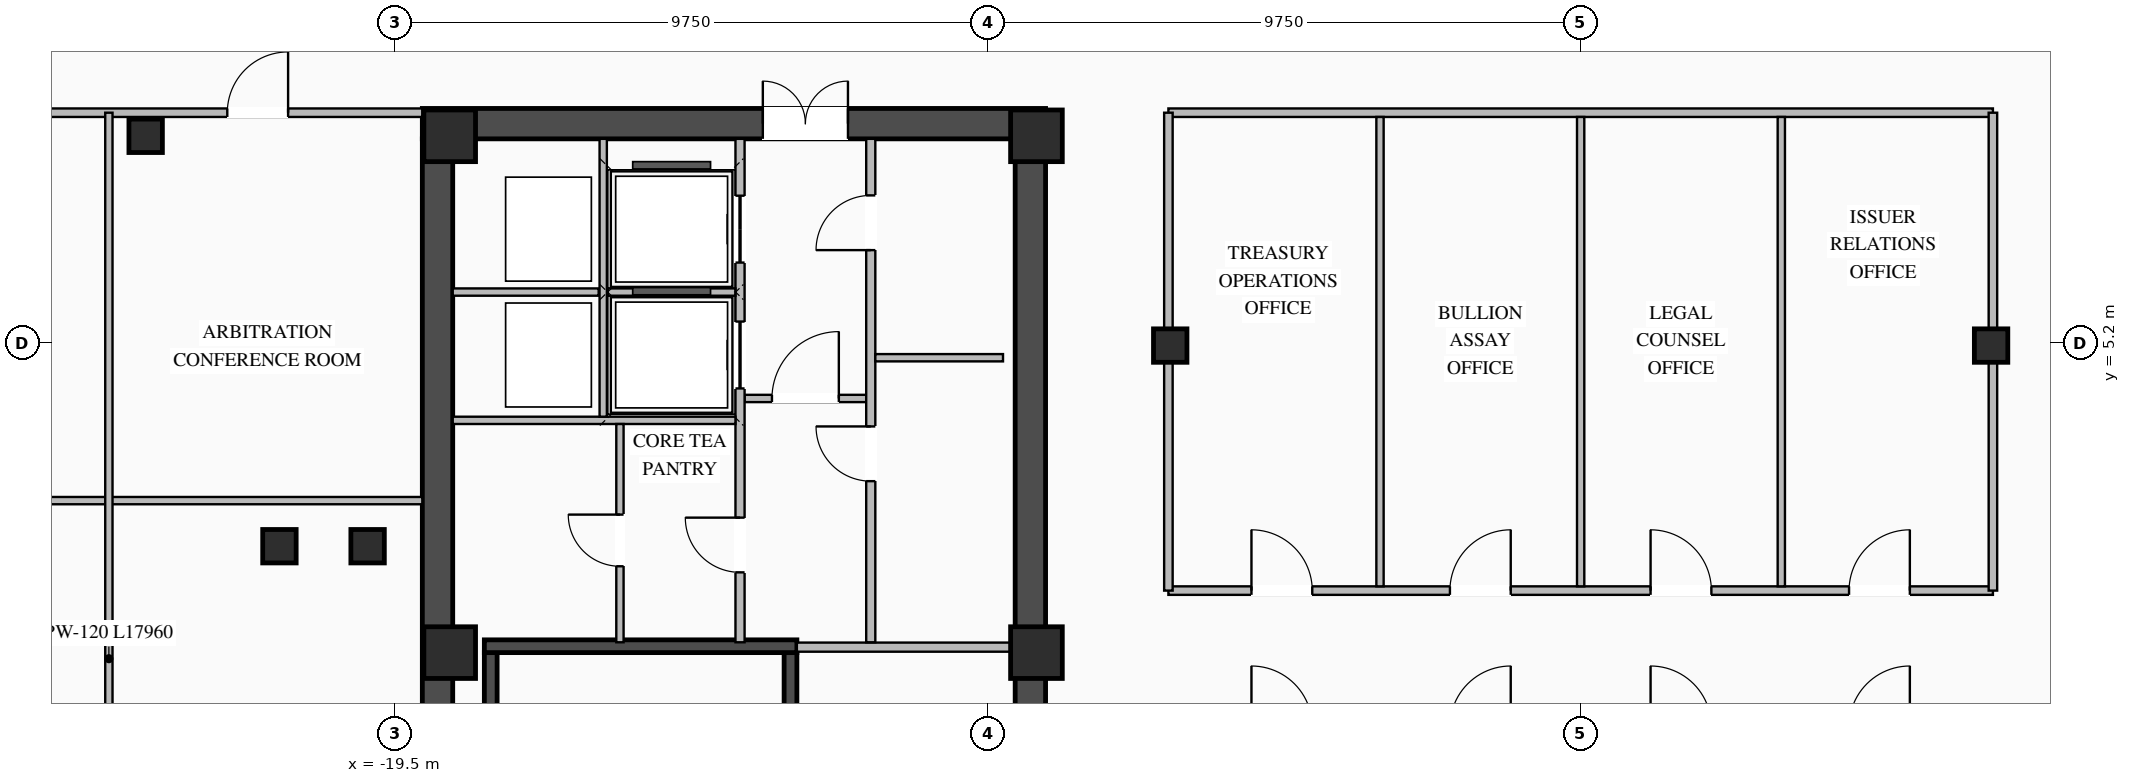
"""IFC4 building model, lengths in metres.
Left out: names, types, materials, properties, quantities, classifications, styles, units other than length and angle.
Written with IfcOpenShell. Run it as: python <this file> out.ifc"""

import sys

from ifc_helpers import new_model, si_unit, direction, frame, frame_2d, origin, origin_2d, place, context, subcontext, project, spatial, rectangle, i_section, extrude, element, fill, save


model = new_model("IFC4")
c1 = context("Model", 3, precision=1e-05, world=origin(), true_north=direction((0.0, 1.0)))
c2 = subcontext(c1, "Body", "Model", "MODEL_VIEW")
j1 = project(units=[si_unit("LENGTHUNIT", "METRE"), si_unit("PLANEANGLEUNIT", "RADIAN")], contexts=[c1])
p1 = place(None, origin())
s1 = spatial("IfcSite", under=j1, at=p1, CompositionType="ELEMENT")
p2 = place(p1, origin())
s2 = spatial("IfcBuilding", under=s1, at=p2, CompositionType="ELEMENT")
p3 = place(p2, frame((0.0, 0.0, 236.1)))
s3 = spatial("IfcBuildingStorey", under=s2, at=p3, CompositionType="ELEMENT", Elevation=236.1)
p4 = place(p3, frame((-19.05, 8.8, 0.0), z_axis=(0.0, 0.0, 1.0), x_axis=(1.0, 0.0, 0.0)))
e1 = element("IfcWall", 1, at=p4, inside=s3, PredefinedType="SHEAR", context=c2, shape_type="SweptSolid", body=[
    extrude(rectangle(XDim=10.25, YDim=0.5, at=frame_2d((5.125, 0.0))), origin(), (0.0, 0.0, 1.0), 3.27),
])
p5 = place(p4, frame((5.6, 0.0, 0.0)))
e2 = element("IfcOpeningElement", 2, at=p5, cuts=e1, PredefinedType="OPENING", context=c2, shape_type="SweptSolid", body=[
    extrude(rectangle(XDim=1.4, YDim=2.05, at=frame_2d((0.7, 1.025))), frame((0.0, 0.26, 0.0), z_axis=(0.0, -1.0, 0.0), x_axis=(1.0, 0.0, 0.0)), (0.0, 0.0, 1.0), 0.52),
])
p6 = place(p3, frame((-18.8, -8.55, 0.0), z_axis=(0.0, 0.0, 1.0), x_axis=(0.0, 1.0, 0.0)))
e3 = element("IfcWall", 3, at=p6, inside=s3, PredefinedType="SHEAR", context=c2, shape_type="SweptSolid", body=[
    extrude(rectangle(XDim=17.1, YDim=0.5, at=frame_2d((8.55, 0.0))), origin(), (0.0, 0.0, 1.0), 3.27),
])
p7 = place(p3, frame((-9.05, -8.55, 0.0), z_axis=(0.0, 0.0, 1.0), x_axis=(0.0, 1.0, 0.0)))
e4 = element("IfcWall", 4, at=p7, inside=s3, PredefinedType="SHEAR", context=c2, shape_type="SweptSolid", body=[
    extrude(rectangle(XDim=17.1, YDim=0.5, at=frame_2d((8.55, 0.0))), origin(), (0.0, 0.0, 1.0), 3.27),
])
p8 = place(p7, frame((5.3, 0.0, 0.0)))
e5 = element("IfcOpeningElement", 5, at=p8, cuts=e4, PredefinedType="OPENING", context=c2, shape_type="SweptSolid", body=[
    extrude(rectangle(XDim=1.1, YDim=2.08, at=frame_2d((0.55, 1.04))), frame((0.0, 0.26, 0.0), z_axis=(0.0, -1.0, 0.0), x_axis=(1.0, 0.0, 0.0)), (0.0, 0.0, 1.0), 0.52),
])
p9 = place(p3, frame((-12.995, -8.1, 0.0), z_axis=(0.0, 0.0, 1.0), x_axis=(0.0, 1.0, 0.0)))
e6 = element("IfcWall", 6, at=p9, inside=s3, PredefinedType="SHEAR", context=c2, shape_type="SweptSolid", body=[
    extrude(rectangle(XDim=8.2, YDim=0.21, at=frame_2d((4.1, 0.0))), origin(), (0.0, 0.0, 1.0), 3.27),
])
p10 = place(p9, frame((6.25, 0.0, 0.0)))
e7 = element("IfcOpeningElement", 7, at=p10, cuts=e6, PredefinedType="OPENING", context=c2, shape_type="SweptSolid", body=[
    extrude(rectangle(XDim=1.1, YDim=2.15, at=frame_2d((0.55, 1.075))), frame((0.0, 0.115, 0.0), z_axis=(0.0, -1.0, 0.0), x_axis=(1.0, 0.0, 0.0)), (0.0, 0.0, 1.0), 0.23),
])
p11 = place(p3, frame((-17.925, -8.1, 0.0), z_axis=(0.0, 0.0, 1.0), x_axis=(0.0, 1.0, 0.0)))
e8 = element("IfcWall", 8, at=p11, inside=s3, PredefinedType="SHEAR", context=c2, shape_type="SweptSolid", body=[
    extrude(rectangle(XDim=8.2, YDim=0.21, at=frame_2d((4.1, 0.0))), origin(), (0.0, 0.0, 1.0), 3.27),
])
p12 = place(p3, frame((-12.89, 0.205, 0.0), z_axis=(0.0, 0.0, 1.0), x_axis=(-1.0, 0.0, 0.0)))
e9 = element("IfcWall", 9, at=p12, inside=s3, PredefinedType="SHEAR", context=c2, shape_type="SweptSolid", body=[
    extrude(rectangle(XDim=5.14, YDim=0.21, at=frame_2d((2.57, 0.0))), origin(), (0.0, 0.0, 1.0), 3.27),
])
for number, where, z_axis, x_axis in (
    (10, (-8.95, 0.1, 0.0), (0.0, 0.0, 1.0), (1.0, 0.0, 0.0)),
    (11, (-8.95, 8.6, 0.0), (0.0, 0.0, 1.0), (1.0, 0.0, 0.0)),
    (12, (-18.6, 0.1, 0.0), (0.0, 0.0, 1.0), (1.0, 0.0, 0.0)),
    (13, (-18.6, 8.6, 0.0), (0.0, 0.0, 1.0), (1.0, 0.0, 0.0)),
):
    element("IfcColumn", number, at=place(p3, frame(where, z_axis=z_axis, x_axis=x_axis)), inside=s3, PredefinedType="COLUMN", context=c2, shape_type="SweptSolid", body=[
        extrude(rectangle(XDim=0.85, YDim=0.85, at=origin_2d()), origin(), (0.0, 0.0, 1.0), 3.45),
    ])
for number, where, z_axis, x_axis in (
    (14, (-6.75, 5.15, 0.0), (0.0, 0.0, 1.0), (1.0, 0.0, 0.0)),
    (15, (6.75, 5.15, 0.0), (0.0, 0.0, 1.0), (1.0, 0.0, 0.0)),
    (16, (-21.4, 1.85, 0.0), (0.0, 0.0, 1.0), (1.0, 0.0, 0.0)),
    (17, (-19.95, 1.85, 0.0), (0.0, 0.0, 1.0), (1.0, 0.0, 0.0)),
    (18, (-23.6, 8.6, 0.0), (0.0, 0.0, 1.0), (1.0, 0.0, 0.0)),
):
    element("IfcColumn", number, at=place(p3, frame(where, z_axis=z_axis, x_axis=x_axis)), inside=s3, PredefinedType="COLUMN", context=c2, shape_type="SweptSolid", body=[
        extrude(i_section(OverallWidth=0.55, OverallDepth=0.55, WebThickness=0.024, FlangeThickness=0.036, at=origin_2d()), origin(), (0.0, 0.0, 1.0), 3.45),
    ])
p13 = place(p3, frame((-12.89, 0.19, 0.0), z_axis=(0.0, 0.0, 1.0), x_axis=(1.0, 0.0, 0.0)))
e19 = element("IfcWall", 19, at=p13, inside=s3, PredefinedType="STANDARD", context=c2, shape_type="SweptSolid", body=[
    extrude(rectangle(XDim=3.59, YDim=0.15, at=frame_2d((1.795, 0.0))), origin(), (0.0, 0.0, 1.0), 2.645),
])
p14 = place(p3, frame((-13.75, 4.28, 0.0), z_axis=(0.0, 0.0, 1.0), x_axis=(1.0, 0.0, 0.0)))
e20 = element("IfcWall", 20, at=p14, inside=s3, PredefinedType="STANDARD", context=c2, shape_type="SweptSolid", body=[
    extrude(rectangle(XDim=2.0, YDim=0.12, at=frame_2d((1.0, 0.0))), origin(), (0.0, 0.0, 1.0), 3.25),
])
p15 = place(p14, frame((0.45, 0.0, 0.0)))
e21 = element("IfcOpeningElement", 21, at=p15, cuts=e20, PredefinedType="OPENING", context=c2, shape_type="SweptSolid", body=[
    extrude(rectangle(XDim=1.1, YDim=2.1, at=frame_2d((0.55, 1.05))), frame((0.0, 0.07, 0.0), z_axis=(0.0, -1.0, 0.0), x_axis=(1.0, 0.0, 0.0)), (0.0, 0.0, 1.0), 0.14),
])
p16 = place(p3, frame((-11.675, 0.27, 0.0), z_axis=(0.0, 0.0, 1.0), x_axis=(0.0, 1.0, 0.0)))
e22 = element("IfcWall", 22, at=p16, inside=s3, PredefinedType="STANDARD", context=c2, shape_type="SweptSolid", body=[
    extrude(rectangle(XDim=8.28, YDim=0.15, at=frame_2d((4.14, 0.0))), origin(), (0.0, 0.0, 1.0), 3.25),
])
p17 = place(p16, frame((2.65, 0.0, 0.0)))
e23 = element("IfcOpeningElement", 23, at=p17, cuts=e22, PredefinedType="OPENING", context=c2, shape_type="SweptSolid", body=[
    extrude(rectangle(XDim=0.9, YDim=2.05, at=frame_2d((0.45, 1.025))), frame((0.0, 0.085, 0.0), z_axis=(0.0, -1.0, 0.0), x_axis=(1.0, 0.0, 0.0)), (0.0, 0.0, 1.0), 0.17),
])
p18 = place(p16, frame((6.45, 0.0, 0.0)))
e24 = element("IfcOpeningElement", 24, at=p18, cuts=e22, PredefinedType="OPENING", context=c2, shape_type="SweptSolid", body=[
    extrude(rectangle(XDim=0.9, YDim=2.05, at=frame_2d((0.45, 1.025))), frame((0.0, 0.085, 0.0), z_axis=(0.0, -1.0, 0.0), x_axis=(1.0, 0.0, 0.0)), (0.0, 0.0, 1.0), 0.17),
])
p19 = place(p3, frame((-11.6, 4.95, 0.0), z_axis=(0.0, 0.0, 1.0), x_axis=(1.0, 0.0, 0.0)))
e25 = element("IfcWall", 25, at=p19, inside=s3, PredefinedType="STANDARD", context=c2, shape_type="SweptSolid", body=[
    extrude(rectangle(XDim=2.1, YDim=0.12, at=frame_2d((1.05, 0.0))), origin(), (0.0, 0.0, 1.0), 3.25),
])
p20 = place(p3, frame((-13.825, 0.27, 0.0), z_axis=(0.0, 0.0, 1.0), x_axis=(0.0, 1.0, 0.0)))
e26 = element("IfcWall", 26, at=p20, inside=s3, PredefinedType="STANDARD", context=c2, shape_type="SweptSolid", body=[
    extrude(rectangle(XDim=8.28, YDim=0.15, at=frame_2d((4.14, 0.0))), origin(), (0.0, 0.0, 1.0), 3.25),
])
p21 = place(p20, frame((4.175, 0.0, 0.0)))
e27 = element("IfcOpeningElement", 27, at=p21, cuts=e26, PredefinedType="OPENING", context=c2, shape_type="SweptSolid", body=[
    extrude(rectangle(XDim=1.1, YDim=2.1, at=frame_2d((0.55, 1.05))), frame((0.0, 0.085, 0.0), z_axis=(0.0, -1.0, 0.0), x_axis=(1.0, 0.0, 0.0)), (0.0, 0.0, 1.0), 0.17),
])
p22 = place(p20, frame((6.245, 0.0, 0.0)))
e28 = element("IfcOpeningElement", 28, at=p22, cuts=e26, PredefinedType="OPENING", context=c2, shape_type="SweptSolid", body=[
    extrude(rectangle(XDim=1.1, YDim=2.1, at=frame_2d((0.55, 1.05))), frame((0.0, 0.085, 0.0), z_axis=(0.0, -1.0, 0.0), x_axis=(1.0, 0.0, 0.0)), (0.0, 0.0, 1.0), 0.17),
])
p23 = place(p20, frame((1.15, 0.0, 0.0)))
e29 = element("IfcOpeningElement", 29, at=p23, cuts=e26, PredefinedType="OPENING", context=c2, shape_type="SweptSolid", body=[
    extrude(rectangle(XDim=0.9, YDim=2.05, at=frame_2d((0.45, 1.025))), frame((0.0, 0.085, 0.0), z_axis=(0.0, -1.0, 0.0), x_axis=(1.0, 0.0, 0.0)), (0.0, 0.0, 1.0), 0.17),
])
p24 = place(p3, frame((-18.55, 3.92, 0.0), z_axis=(0.0, 0.0, 1.0), x_axis=(1.0, 0.0, 0.0)))
e30 = element("IfcWall", 30, at=p24, inside=s3, PredefinedType="STANDARD", context=c2, shape_type="SweptSolid", body=[
    extrude(rectangle(XDim=4.65, YDim=0.12, at=frame_2d((2.325, 0.0))), origin(), (0.0, 0.0, 1.0), 3.25),
])
p25 = place(p3, frame((-18.55, 6.03, 0.0), z_axis=(0.0, 0.0, 1.0), x_axis=(1.0, 0.0, 0.0)))
e31 = element("IfcWall", 31, at=p25, inside=s3, PredefinedType="STANDARD", context=c2, shape_type="SweptSolid", body=[
    extrude(rectangle(XDim=2.4, YDim=0.12, at=frame_2d((1.2, 0.0))), origin(), (0.0, 0.0, 1.0), 3.25),
])
p26 = place(p3, frame((-16.075, 3.98, 0.0), z_axis=(0.0, 0.0, 1.0), x_axis=(0.0, 1.0, 0.0)))
e32 = element("IfcWall", 32, at=p26, inside=s3, PredefinedType="STANDARD", context=c2, shape_type="SweptSolid", body=[
    extrude(rectangle(XDim=4.57, YDim=0.12, at=frame_2d((2.285, 0.0))), origin(), (0.0, 0.0, 1.0), 3.25),
])
p27 = place(p3, frame((-16.0, 6.03, 0.0), z_axis=(0.0, 0.0, 1.0), x_axis=(1.0, 0.0, 0.0)))
e33 = element("IfcWall", 33, at=p27, inside=s3, PredefinedType="STANDARD", context=c2, shape_type="SweptSolid", body=[
    extrude(rectangle(XDim=2.1, YDim=0.12, at=frame_2d((1.05, 0.0))), origin(), (0.0, 0.0, 1.0), 3.25),
])
p28 = place(p3, frame((-15.8, 0.27, 0.0), z_axis=(0.0, 0.0, 1.0), x_axis=(0.0, 1.0, 0.0)))
e34 = element("IfcWall", 34, at=p28, inside=s3, PredefinedType="STANDARD", context=c2, shape_type="SweptSolid", body=[
    extrude(rectangle(XDim=3.59, YDim=0.12, at=frame_2d((1.795, 0.0))), origin(), (0.0, 0.0, 1.0), 3.25),
])
p29 = place(p28, frame((1.25, 0.0, 0.0)))
e35 = element("IfcOpeningElement", 35, at=p29, cuts=e34, PredefinedType="OPENING", context=c2, shape_type="SweptSolid", body=[
    extrude(rectangle(XDim=0.85, YDim=2.05, at=frame_2d((0.425, 1.025))), frame((0.0, 0.07, 0.0), z_axis=(0.0, -1.0, 0.0), x_axis=(1.0, 0.0, 0.0)), (0.0, 0.0, 1.0), 0.14),
])
p30 = place(p3, frame((-29.62, 8.98, 0.0), z_axis=(0.0, 0.0, 1.0), x_axis=(1.0, 0.0, 0.0)))
e36 = element("IfcWall", 36, at=p30, inside=s3, PredefinedType="STANDARD", context=c2, shape_type="SweptSolid", body=[
    extrude(rectangle(XDim=10.57, YDim=0.14, at=frame_2d((5.285, 0.0))), origin(), (0.0, 0.0, 1.0), 3.25),
])
p31 = place(p30, frame((2.337, 0.0, 0.0)))
e37 = element("IfcOpeningElement", 37, at=p31, cuts=e36, PredefinedType="OPENING", context=c2, shape_type="SweptSolid", body=[
    extrude(rectangle(XDim=1.0, YDim=2.08, at=frame_2d((0.5, 1.04))), frame((0.0, 0.08, 0.0), z_axis=(0.0, -1.0, 0.0), x_axis=(1.0, 0.0, 0.0)), (0.0, 0.0, 1.0), 0.16),
])
p32 = place(p30, frame((7.363, 0.0, 0.0)))
e38 = element("IfcOpeningElement", 38, at=p32, cuts=e36, PredefinedType="OPENING", context=c2, shape_type="SweptSolid", body=[
    extrude(rectangle(XDim=1.0, YDim=2.08, at=frame_2d((0.5, 1.04))), frame((0.0, 0.08, 0.0), z_axis=(0.0, -1.0, 0.0), x_axis=(1.0, 0.0, 0.0)), (0.0, 0.0, 1.0), 0.16),
])
p33 = place(p3, frame((-29.62, 2.6, 0.0), z_axis=(0.0, 0.0, 1.0), x_axis=(1.0, 0.0, 0.0)))
e39 = element("IfcWall", 39, at=p33, inside=s3, PredefinedType="STANDARD", context=c2, shape_type="SweptSolid", body=[
    extrude(rectangle(XDim=10.57, YDim=0.12, at=frame_2d((5.285, 0.0))), origin(), (0.0, 0.0, 1.0), 3.25),
])
p34 = place(p3, frame((-24.205, -8.98, 0.0), z_axis=(0.0, 0.0, 1.0), x_axis=(0.0, 1.0, 0.0)))
e40 = element("IfcWall", 40, at=p34, inside=s3, PredefinedType="STANDARD", context=c2, shape_type="SweptSolid", body=[
    extrude(rectangle(XDim=17.96, YDim=0.12, at=frame_2d((8.98, 0.0))), origin(), (0.0, 0.0, 1.0), 3.25),
])
p35 = place(p3, frame((-6.78, 1.12, 0.0), z_axis=(0.0, 0.0, 1.0), x_axis=(1.0, 0.0, 0.0)))
e41 = element("IfcWall", 41, at=p35, inside=s3, PredefinedType="STANDARD", context=c2, shape_type="SweptSolid", body=[
    extrude(rectangle(XDim=13.56, YDim=0.14, at=frame_2d((6.78, 0.0))), origin(), (0.0, 0.0, 1.0), 3.25),
])
p36 = place(p35, frame((1.366, 0.0, 0.0)))
e42 = element("IfcOpeningElement", 42, at=p36, cuts=e41, PredefinedType="OPENING", context=c2, shape_type="SweptSolid", body=[
    extrude(rectangle(XDim=1.0, YDim=2.08, at=frame_2d((0.5, 1.04))), frame((0.0, 0.08, 0.0), z_axis=(0.0, -1.0, 0.0), x_axis=(1.0, 0.0, 0.0)), (0.0, 0.0, 1.0), 0.16),
])
p37 = place(p35, frame((4.63, 0.0, 0.0)))
e43 = element("IfcOpeningElement", 43, at=p37, cuts=e41, PredefinedType="OPENING", context=c2, shape_type="SweptSolid", body=[
    extrude(rectangle(XDim=1.0, YDim=2.08, at=frame_2d((0.5, 1.04))), frame((0.0, 0.08, 0.0), z_axis=(0.0, -1.0, 0.0), x_axis=(1.0, 0.0, 0.0)), (0.0, 0.0, 1.0), 0.16),
])
p38 = place(p35, frame((7.93, 0.0, 0.0)))
e44 = element("IfcOpeningElement", 44, at=p38, cuts=e41, PredefinedType="OPENING", context=c2, shape_type="SweptSolid", body=[
    extrude(rectangle(XDim=1.0, YDim=2.08, at=frame_2d((0.5, 1.04))), frame((0.0, 0.08, 0.0), z_axis=(0.0, -1.0, 0.0), x_axis=(1.0, 0.0, 0.0)), (0.0, 0.0, 1.0), 0.16),
])
p39 = place(p35, frame((11.194, 0.0, 0.0)))
e45 = element("IfcOpeningElement", 45, at=p39, cuts=e41, PredefinedType="OPENING", context=c2, shape_type="SweptSolid", body=[
    extrude(rectangle(XDim=1.0, YDim=2.08, at=frame_2d((0.5, 1.04))), frame((0.0, 0.08, 0.0), z_axis=(0.0, -1.0, 0.0), x_axis=(1.0, 0.0, 0.0)), (0.0, 0.0, 1.0), 0.16),
])
p40 = place(p3, frame((-6.78, 8.98, 0.0), z_axis=(0.0, 0.0, 1.0), x_axis=(1.0, 0.0, 0.0)))
e46 = element("IfcWall", 46, at=p40, inside=s3, PredefinedType="STANDARD", context=c2, shape_type="SweptSolid", body=[
    extrude(rectangle(XDim=13.56, YDim=0.14, at=frame_2d((6.78, 0.0))), origin(), (0.0, 0.0, 1.0), 3.25),
])
for number, where, z_axis, x_axis in (
    (47, (-6.78, 1.12, 0.0), (0.0, 0.0, 1.0), (0.0, 1.0, 0.0)),
    (48, (6.78, 1.12, 0.0), (0.0, 0.0, 1.0), (0.0, 1.0, 0.0)),
):
    element("IfcWall", number, at=place(p3, frame(where, z_axis=z_axis, x_axis=x_axis)), inside=s3, PredefinedType="STANDARD", context=c2, shape_type="SweptSolid", body=[
        extrude(rectangle(XDim=7.86, YDim=0.14, at=frame_2d((3.93, 0.0))), origin(), (0.0, 0.0, 1.0), 2.645),
    ])
for number, where, z_axis, x_axis in (
    (49, (-3.3, 1.19, 0.0), (0.0, 0.0, 1.0), (0.0, 1.0, 0.0)),
    (50, (0.0, 1.19, 0.0), (0.0, 0.0, 1.0), (0.0, 1.0, 0.0)),
    (51, (3.3, 1.19, 0.0), (0.0, 0.0, 1.0), (0.0, 1.0, 0.0)),
):
    element("IfcWall", number, at=place(p3, frame(where, z_axis=z_axis, x_axis=x_axis)), inside=s3, PredefinedType="STANDARD", context=c2, shape_type="SweptSolid", body=[
        extrude(rectangle(XDim=7.72, YDim=0.12, at=frame_2d((3.86, 0.0))), origin(), (0.0, 0.0, 1.0), 3.25),
    ])
p41 = place(p15, origin())
e52 = element("IfcDoor", 52, at=p41, inside=s3, OperationType="SINGLE_SWING_RIGHT", PredefinedType="DOOR", context=c2, shape_type="SweptSolid", body=[
    extrude(rectangle(XDim=1.1, YDim=2.1, at=frame_2d((0.55, 1.05))), frame((0.0, 0.025, 0.0), z_axis=(0.0, -1.0, 0.0), x_axis=(1.0, 0.0, 0.0)), (0.0, 0.0, 1.0), 0.05),
])
fill(e21, e52)
p42 = place(p5, origin())
e53 = element("IfcDoor", 53, at=p42, inside=s3, OperationType="DOUBLE_DOOR_SINGLE_SWING", PredefinedType="DOOR", context=c2, shape_type="SweptSolid", body=[
    extrude(rectangle(XDim=1.4, YDim=2.05, at=frame_2d((0.7, 1.025))), frame((0.0, 0.195, 0.0), z_axis=(0.0, -1.0, 0.0), x_axis=(1.0, 0.0, 0.0)), (0.0, 0.0, 1.0), 0.05),
])
fill(e2, e53)
p43 = place(p17, origin())
e54 = element("IfcDoor", 54, at=p43, inside=s3, OperationType="SINGLE_SWING_RIGHT", PredefinedType="DOOR", context=c2, shape_type="SweptSolid", body=[
    extrude(rectangle(XDim=0.9, YDim=2.05, at=frame_2d((0.45, 1.025))), frame((0.0, 0.025, 0.0), z_axis=(0.0, -1.0, 0.0), x_axis=(1.0, 0.0, 0.0)), (0.0, 0.0, 1.0), 0.05),
])
fill(e23, e54)
p44 = place(p18, origin())
e55 = element("IfcDoor", 55, at=p44, inside=s3, OperationType="SINGLE_SWING_LEFT", PredefinedType="DOOR", context=c2, shape_type="SweptSolid", body=[
    extrude(rectangle(XDim=0.9, YDim=2.05, at=frame_2d((0.45, 1.025))), frame((0.0, 0.025, 0.0), z_axis=(0.0, -1.0, 0.0), x_axis=(1.0, 0.0, 0.0)), (0.0, 0.0, 1.0), 0.05),
])
fill(e24, e55)
p45 = place(p21, origin())
e56 = element("IfcDoor", 56, at=p45, inside=s3, OperationType="DOUBLE_DOOR_SLIDING", PredefinedType="DOOR", context=c2, shape_type="SweptSolid", body=[
    extrude(rectangle(XDim=1.1, YDim=2.1, at=frame_2d((0.55, 1.05))), frame((0.0, 0.025, 0.0), z_axis=(0.0, -1.0, 0.0), x_axis=(1.0, 0.0, 0.0)), (0.0, 0.0, 1.0), 0.05),
])
fill(e27, e56)
p46 = place(p22, origin())
e57 = element("IfcDoor", 57, at=p46, inside=s3, OperationType="DOUBLE_DOOR_SLIDING", PredefinedType="DOOR", context=c2, shape_type="SweptSolid", body=[
    extrude(rectangle(XDim=1.1, YDim=2.1, at=frame_2d((0.55, 1.05))), frame((0.0, 0.025, 0.0), z_axis=(0.0, -1.0, 0.0), x_axis=(1.0, 0.0, 0.0)), (0.0, 0.0, 1.0), 0.05),
])
fill(e28, e57)
p47 = place(p23, origin())
e58 = element("IfcDoor", 58, at=p47, inside=s3, OperationType="SINGLE_SWING_RIGHT", PredefinedType="DOOR", context=c2, shape_type="SweptSolid", body=[
    extrude(rectangle(XDim=0.9, YDim=2.05, at=frame_2d((0.45, 1.025))), frame((0.0, 0.025, 0.0), z_axis=(0.0, -1.0, 0.0), x_axis=(1.0, 0.0, 0.0)), (0.0, 0.0, 1.0), 0.05),
])
fill(e29, e58)
p48 = place(p29, origin())
e59 = element("IfcDoor", 59, at=p48, inside=s3, OperationType="SINGLE_SWING_RIGHT", PredefinedType="DOOR", context=c2, shape_type="SweptSolid", body=[
    extrude(rectangle(XDim=0.85, YDim=2.05, at=frame_2d((0.425, 1.025))), frame((0.0, 0.025, 0.0), z_axis=(0.0, -1.0, 0.0), x_axis=(1.0, 0.0, 0.0)), (0.0, 0.0, 1.0), 0.05),
])
fill(e35, e59)
p49 = place(p32, origin())
e60 = element("IfcDoor", 60, at=p49, inside=s3, OperationType="SINGLE_SWING_RIGHT", PredefinedType="DOOR", context=c2, shape_type="SweptSolid", body=[
    extrude(rectangle(XDim=1.0, YDim=2.08, at=frame_2d((0.5, 1.04))), frame((0.0, 0.025, 0.0), z_axis=(0.0, -1.0, 0.0), x_axis=(1.0, 0.0, 0.0)), (0.0, 0.0, 1.0), 0.05),
])
fill(e38, e60)
p50 = place(p36, origin())
e61 = element("IfcDoor", 61, at=p50, inside=s3, OperationType="SINGLE_SWING_LEFT", PredefinedType="DOOR", context=c2, shape_type="SweptSolid", body=[
    extrude(rectangle(XDim=1.0, YDim=2.08, at=frame_2d((0.5, 1.04))), frame((0.0, 0.025, 0.0), z_axis=(0.0, -1.0, 0.0), x_axis=(1.0, 0.0, 0.0)), (0.0, 0.0, 1.0), 0.05),
])
fill(e42, e61)
p51 = place(p37, origin())
e62 = element("IfcDoor", 62, at=p51, inside=s3, OperationType="SINGLE_SWING_RIGHT", PredefinedType="DOOR", context=c2, shape_type="SweptSolid", body=[
    extrude(rectangle(XDim=1.0, YDim=2.08, at=frame_2d((0.5, 1.04))), frame((0.0, 0.025, 0.0), z_axis=(0.0, -1.0, 0.0), x_axis=(1.0, 0.0, 0.0)), (0.0, 0.0, 1.0), 0.05),
])
fill(e43, e62)
p52 = place(p38, origin())
e63 = element("IfcDoor", 63, at=p52, inside=s3, OperationType="SINGLE_SWING_LEFT", PredefinedType="DOOR", context=c2, shape_type="SweptSolid", body=[
    extrude(rectangle(XDim=1.0, YDim=2.08, at=frame_2d((0.5, 1.04))), frame((0.0, 0.025, 0.0), z_axis=(0.0, -1.0, 0.0), x_axis=(1.0, 0.0, 0.0)), (0.0, 0.0, 1.0), 0.05),
])
fill(e44, e63)
p53 = place(p39, origin())
e64 = element("IfcDoor", 64, at=p53, inside=s3, OperationType="SINGLE_SWING_RIGHT", PredefinedType="DOOR", context=c2, shape_type="SweptSolid", body=[
    extrude(rectangle(XDim=1.0, YDim=2.08, at=frame_2d((0.5, 1.04))), frame((0.0, 0.025, 0.0), z_axis=(0.0, -1.0, 0.0), x_axis=(1.0, 0.0, 0.0)), (0.0, 0.0, 1.0), 0.05),
])
fill(e45, e64)
save(model, sys.argv[1])
